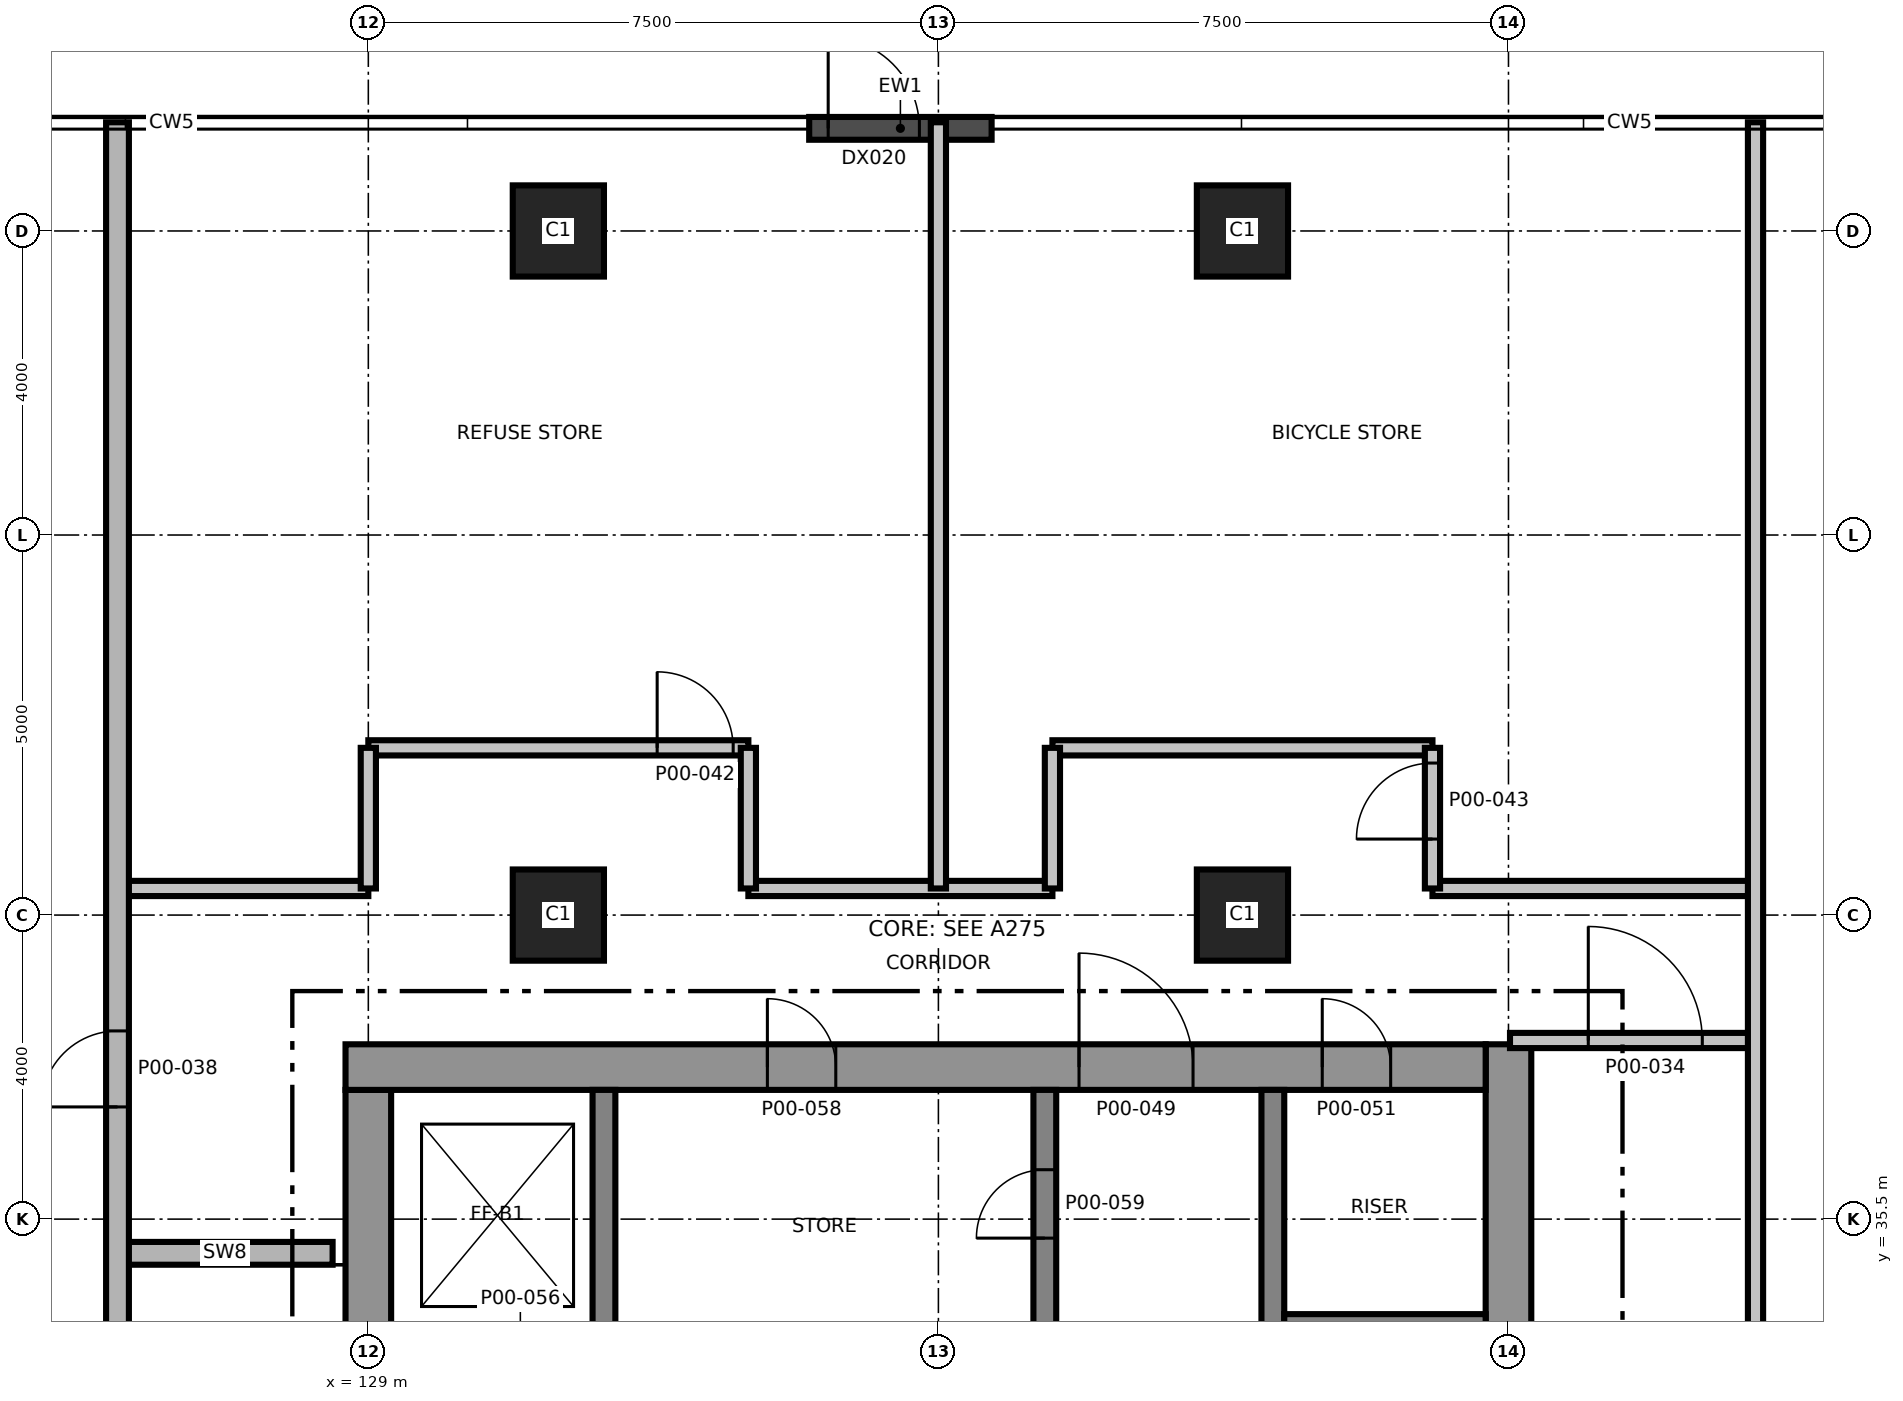
"""IFC4 building model, lengths in metres.
Left out: names, types, materials, properties, quantities, classifications, styles, units other than length and angle.
Written with IfcOpenShell. Run it as: python <this file> out.ifc"""

import sys

from ifc_helpers import new_model, si_unit, direction, frame, frame_2d, origin, origin_2d, place, context, subcontext, project, spatial, rectangle, extrude, element, fill, save


model = new_model("IFC4")
c1 = context("Model", 3, precision=1e-05, world=origin(), true_north=direction((0.0, 1.0)))
c2 = subcontext(c1, "Body", "Model", "MODEL_VIEW")
j1 = project(units=[si_unit("LENGTHUNIT", "METRE"), si_unit("PLANEANGLEUNIT", "RADIAN")], contexts=[c1])
p1 = place(None, origin())
s1 = spatial("IfcSite", under=j1, at=p1, CompositionType="ELEMENT")
p2 = place(p1, origin())
s2 = spatial("IfcBuilding", under=s1, at=p2, CompositionType="ELEMENT")
p3 = place(p2, origin())
s3 = spatial("IfcBuildingStorey", under=s2, at=p3, CompositionType="ELEMENT", Elevation=0.0)
p4 = place(p3, frame((129.0, 24.8, 0.0), z_axis=(0.0, 0.0, 1.0), x_axis=(0.0, 1.0, 0.0)))
e1 = element("IfcWall", 1, at=p4, inside=s3, PredefinedType="SHEAR", context=c2, shape_type="SweptSolid", body=[
    extrude(rectangle(XDim=12.4, YDim=0.6, at=frame_2d((6.2, 0.0))), origin(), (0.0, 0.0, 1.0), 8.0),
])
p5 = place(p4, frame((5.15, 0.0, 0.0)))
e2 = element("IfcOpeningElement", 2, at=p5, cuts=e1, PredefinedType="OPENING", context=c2, shape_type="SweptSolid", body=[
    extrude(rectangle(XDim=1.0, YDim=2.1, at=frame_2d((0.5, 1.05))), frame((0.0, 0.31, 0.0), z_axis=(0.0, -1.0, 0.0), x_axis=(1.0, 0.0, 0.0)), (0.0, 0.0, 1.0), 0.62),
])
p6 = place(p3, frame((144.0, 24.2, 0.0), z_axis=(0.0, 0.0, 1.0), x_axis=(0.0, 1.0, 0.0)))
e3 = element("IfcWall", 3, at=p6, inside=s3, PredefinedType="SHEAR", context=c2, shape_type="SweptSolid", body=[
    extrude(rectangle(XDim=13.6, YDim=0.6, at=frame_2d((6.8, 0.0))), origin(), (0.0, 0.0, 1.0), 8.0),
])
p7 = place(p3, frame((128.7, 37.5, 0.0), z_axis=(0.0, 0.0, 1.0), x_axis=(1.0, 0.0, 0.0)))
e4 = element("IfcWall", 4, at=p7, inside=s3, PredefinedType="SHEAR", context=c2, shape_type="SweptSolid", body=[
    extrude(rectangle(XDim=15.0, YDim=0.6, at=frame_2d((7.5, 0.0))), origin(), (0.0, 0.0, 1.0), 8.0),
])
p8 = place(p7, frame((9.65, 0.0, 0.0)))
e5 = element("IfcOpeningElement", 5, at=p8, cuts=e4, PredefinedType="OPENING", context=c2, shape_type="SweptSolid", body=[
    extrude(rectangle(XDim=1.5, YDim=2.1, at=frame_2d((0.75, 1.05))), frame((0.0, 0.31, 0.0), z_axis=(0.0, -1.0, 0.0), x_axis=(1.0, 0.0, 0.0)), (0.0, 0.0, 1.0), 0.62),
])
p9 = place(p7, frame((12.85, 0.0, 0.0)))
e6 = element("IfcOpeningElement", 6, at=p9, cuts=e4, PredefinedType="OPENING", context=c2, shape_type="SweptSolid", body=[
    extrude(rectangle(XDim=0.9, YDim=2.1, at=frame_2d((0.45, 1.05))), frame((0.0, 0.31, 0.0), z_axis=(0.0, -1.0, 0.0), x_axis=(1.0, 0.0, 0.0)), (0.0, 0.0, 1.0), 0.62),
])
p10 = place(p7, frame((5.55, 0.0, 0.0)))
e7 = element("IfcOpeningElement", 7, at=p10, cuts=e4, PredefinedType="OPENING", context=c2, shape_type="SweptSolid", body=[
    extrude(rectangle(XDim=0.9, YDim=2.1, at=frame_2d((0.45, 1.05))), frame((0.0, 0.31, 0.0), z_axis=(0.0, -1.0, 0.0), x_axis=(1.0, 0.0, 0.0)), (0.0, 0.0, 1.0), 0.62),
])
p11 = place(p3, frame((132.1, 24.8, 0.0), z_axis=(0.0, 0.0, 1.0), x_axis=(0.0, 1.0, 0.0)))
e8 = element("IfcWall", 8, at=p11, inside=s3, PredefinedType="SHEAR", context=c2, shape_type="SweptSolid", body=[
    extrude(rectangle(XDim=12.4, YDim=0.3, at=frame_2d((6.2, 0.0))), origin(), (0.0, 0.0, 1.0), 8.0),
])
p12 = place(p11, frame((3.9, 0.0, 0.0)))
e9 = element("IfcOpeningElement", 9, at=p12, cuts=e8, PredefinedType="OPENING", context=c2, shape_type="SweptSolid", body=[
    extrude(rectangle(XDim=1.2, YDim=2.1, at=frame_2d((0.6, 1.05))), frame((0.0, 0.16, 0.0), z_axis=(0.0, -1.0, 0.0), x_axis=(1.0, 0.0, 0.0)), (0.0, 0.0, 1.0), 0.32),
])
p13 = place(p3, frame((137.9, 24.8, 0.0), z_axis=(0.0, 0.0, 1.0), x_axis=(0.0, 1.0, 0.0)))
e10 = element("IfcWall", 10, at=p13, inside=s3, PredefinedType="SHEAR", context=c2, shape_type="SweptSolid", body=[
    extrude(rectangle(XDim=12.4, YDim=0.3, at=frame_2d((6.2, 0.0))), origin(), (0.0, 0.0, 1.0), 8.0),
])
p14 = place(p13, frame((3.95, 0.0, 0.0)))
e11 = element("IfcOpeningElement", 11, at=p14, cuts=e10, PredefinedType="OPENING", context=c2, shape_type="SweptSolid", body=[
    extrude(rectangle(XDim=1.5, YDim=2.1, at=frame_2d((0.75, 1.05))), frame((0.0, 0.16, 0.0), z_axis=(0.0, -1.0, 0.0), x_axis=(1.0, 0.0, 0.0)), (0.0, 0.0, 1.0), 0.32),
])
p15 = place(p13, frame((10.45, 0.0, 0.0)))
e12 = element("IfcOpeningElement", 12, at=p15, cuts=e10, PredefinedType="OPENING", context=c2, shape_type="SweptSolid", body=[
    extrude(rectangle(XDim=0.9, YDim=2.1, at=frame_2d((0.45, 1.05))), frame((0.0, 0.16, 0.0), z_axis=(0.0, -1.0, 0.0), x_axis=(1.0, 0.0, 0.0)), (0.0, 0.0, 1.0), 0.32),
])
p16 = place(p3, frame((140.9, 24.8, 0.0), z_axis=(0.0, 0.0, 1.0), x_axis=(0.0, 1.0, 0.0)))
e13 = element("IfcWall", 13, at=p16, inside=s3, PredefinedType="SHEAR", context=c2, shape_type="SweptSolid", body=[
    extrude(rectangle(XDim=12.4, YDim=0.3, at=frame_2d((6.2, 0.0))), origin(), (0.0, 0.0, 1.0), 8.0),
])
p17 = place(p16, frame((5.9, 0.0, 0.0)))
e14 = element("IfcOpeningElement", 14, at=p17, cuts=e13, PredefinedType="OPENING", context=c2, shape_type="SweptSolid", body=[
    extrude(rectangle(XDim=1.2, YDim=2.1, at=frame_2d((0.6, 1.05))), frame((0.0, 0.16, 0.0), z_axis=(0.0, -1.0, 0.0), x_axis=(1.0, 0.0, 0.0)), (0.0, 0.0, 1.0), 0.32),
])
p18 = place(p3, frame((141.05, 34.1, 0.0), z_axis=(0.0, 0.0, 1.0), x_axis=(1.0, 0.0, 0.0)))
e15 = element("IfcWall", 15, at=p18, inside=s3, PredefinedType="SHEAR", context=c2, shape_type="SweptSolid", body=[
    extrude(rectangle(XDim=2.65, YDim=0.3, at=frame_2d((1.325, 0.0))), origin(), (0.0, 0.0, 1.0), 8.0),
])
for number, where, z_axis, x_axis in (
    (16, (131.5, 39.5, 0.0), (0.0, 0.0, 1.0), (1.0, 0.0, 0.0)),
    (17, (140.5, 39.5, 0.0), (0.0, 0.0, 1.0), (1.0, 0.0, 0.0)),
    (18, (131.5, 48.5, 0.0), (0.0, 0.0, 1.0), (1.0, 0.0, 0.0)),
    (19, (140.5, 48.5, 0.0), (0.0, 0.0, 1.0), (1.0, 0.0, 0.0)),
):
    element("IfcColumn", number, at=place(p3, frame(where, z_axis=z_axis, x_axis=x_axis)), inside=s3, PredefinedType="COLUMN", context=c2, shape_type="SweptSolid", body=[
        extrude(rectangle(XDim=1.2, YDim=1.2, at=origin_2d()), origin(), (0.0, 0.0, 1.0), 8.0),
    ])
p19 = place(p3, frame((134.8, 49.85, 0.0), z_axis=(0.0, 0.0, 1.0), x_axis=(1.0, 0.0, 0.0)))
e20 = element("IfcWall", 20, at=p19, inside=s3, PredefinedType="SOLIDWALL", context=c2, shape_type="SweptSolid", body=[
    extrude(rectangle(XDim=2.4, YDim=0.3, at=frame_2d((1.2, 0.0))), origin(), (0.0, 0.0, 1.0), 7.7),
])
p20 = place(p19, frame((0.25, 0.0, 0.0)))
e21 = element("IfcOpeningElement", 21, at=p20, cuts=e20, PredefinedType="OPENING", context=c2, shape_type="SweptSolid", body=[
    extrude(rectangle(XDim=1.2, YDim=2.4, at=frame_2d((0.6, 1.2))), frame((0.0, 0.16, 0.0), z_axis=(0.0, -1.0, 0.0), x_axis=(1.0, 0.0, 0.0)), (0.0, 0.0, 1.0), 0.32),
])
p21 = place(p3, frame((125.7, 35.05, 0.0), z_axis=(0.0, 0.0, 1.0), x_axis=(1.0, 0.0, 0.0)))
e22 = element("IfcWall", 22, at=p21, inside=s3, PredefinedType="SHEAR", context=c2, shape_type="SweptSolid", body=[
    extrude(rectangle(XDim=2.83, YDim=0.3, at=frame_2d((1.415, 0.0))), origin(), (0.0, 0.0, 1.0), 7.7),
])
p22 = place(p3, frame((144.02, 37.85, 0.0), z_axis=(0.0, 0.0, 1.0), x_axis=(1.0, 0.0, 0.0)))
e23 = element("IfcWall", 23, at=p22, inside=s3, PredefinedType="PARTITIONING", context=c2, shape_type="SweptSolid", body=[
    extrude(rectangle(XDim=3.23, YDim=0.2, at=frame_2d((1.615, 0.0))), origin(), (0.0, 0.0, 1.0), 7.7),
])
p23 = place(p22, frame((1.03, 0.0, 0.0)))
e24 = element("IfcOpeningElement", 24, at=p23, cuts=e23, PredefinedType="OPENING", context=c2, shape_type="SweptSolid", body=[
    extrude(rectangle(XDim=1.5, YDim=2.1, at=frame_2d((0.75, 1.05))), frame((0.0, 0.11, 0.0), z_axis=(0.0, -1.0, 0.0), x_axis=(1.0, 0.0, 0.0)), (0.0, 0.0, 1.0), 0.22),
])
p24 = place(p3, frame((125.75, 39.85, 0.0), z_axis=(0.0, 0.0, 1.0), x_axis=(1.0, 0.0, 0.0)))
e25 = element("IfcWall", 25, at=p24, inside=s3, PredefinedType="PARTITIONING", context=c2, shape_type="SweptSolid", body=[
    extrude(rectangle(XDim=3.25, YDim=0.2, at=frame_2d((1.625, 0.0))), origin(), (0.0, 0.0, 1.0), 7.7),
])
p25 = place(p3, frame((134.0, 39.85, 0.0), z_axis=(0.0, 0.0, 1.0), x_axis=(1.0, 0.0, 0.0)))
e26 = element("IfcWall", 26, at=p25, inside=s3, PredefinedType="PARTITIONING", context=c2, shape_type="SweptSolid", body=[
    extrude(rectangle(XDim=4.0, YDim=0.2, at=frame_2d((2.0, 0.0))), origin(), (0.0, 0.0, 1.0), 7.7),
])
p26 = place(p3, frame((143.0, 39.85, 0.0), z_axis=(0.0, 0.0, 1.0), x_axis=(1.0, 0.0, 0.0)))
e27 = element("IfcWall", 27, at=p26, inside=s3, PredefinedType="PARTITIONING", context=c2, shape_type="SweptSolid", body=[
    extrude(rectangle(XDim=4.25, YDim=0.2, at=frame_2d((2.125, 0.0))), origin(), (0.0, 0.0, 1.0), 7.7),
])
p27 = place(p3, frame((129.0, 41.7, 0.0), z_axis=(0.0, 0.0, 1.0), x_axis=(1.0, 0.0, 0.0)))
e28 = element("IfcWall", 28, at=p27, inside=s3, PredefinedType="PARTITIONING", context=c2, shape_type="SweptSolid", body=[
    extrude(rectangle(XDim=5.0, YDim=0.2, at=frame_2d((2.5, 0.0))), origin(), (0.0, 0.0, 1.0), 7.7),
])
p28 = place(p27, frame((3.8, 0.0, 0.0)))
e29 = element("IfcOpeningElement", 29, at=p28, cuts=e28, PredefinedType="OPENING", context=c2, shape_type="SweptSolid", body=[
    extrude(rectangle(XDim=1.0, YDim=2.1, at=frame_2d((0.5, 1.05))), frame((0.0, 0.11, 0.0), z_axis=(0.0, -1.0, 0.0), x_axis=(1.0, 0.0, 0.0)), (0.0, 0.0, 1.0), 0.22),
])
p29 = place(p3, frame((138.0, 41.7, 0.0), z_axis=(0.0, 0.0, 1.0), x_axis=(1.0, 0.0, 0.0)))
e30 = element("IfcWall", 30, at=p29, inside=s3, PredefinedType="PARTITIONING", context=c2, shape_type="SweptSolid", body=[
    extrude(rectangle(XDim=5.0, YDim=0.2, at=frame_2d((2.5, 0.0))), origin(), (0.0, 0.0, 1.0), 7.7),
])
p30 = place(p3, frame((125.7, 11.07, 0.0), z_axis=(0.0, 0.0, 1.0), x_axis=(0.0, 1.0, 0.0)))
e31 = element("IfcWall", 31, at=p30, inside=s3, PredefinedType="SHEAR", context=c2, shape_type="SweptSolid", body=[
    extrude(rectangle(XDim=38.86, YDim=0.3, at=frame_2d((19.43, 0.0))), origin(), (0.0, 0.0, 1.0), 7.7),
])
p31 = place(p30, frame((25.906, 0.0, 0.0)))
e32 = element("IfcOpeningElement", 32, at=p31, cuts=e31, PredefinedType="OPENING", context=c2, shape_type="SweptSolid", body=[
    extrude(rectangle(XDim=1.0, YDim=2.1, at=frame_2d((0.5, 1.05))), frame((0.0, 0.16, 0.0), z_axis=(0.0, -1.0, 0.0), x_axis=(1.0, 0.0, 0.0)), (0.0, 0.0, 1.0), 0.32),
])
for number, where, z_axis, x_axis in (
    (33, (129.0, 39.85, 0.0), (0.0, 0.0, 1.0), (0.0, 1.0, 0.0)),
    (34, (134.0, 39.85, 0.0), (0.0, 0.0, 1.0), (0.0, 1.0, 0.0)),
):
    element("IfcWall", number, at=place(p3, frame(where, z_axis=z_axis, x_axis=x_axis)), inside=s3, PredefinedType="PARTITIONING", context=c2, shape_type="SweptSolid", body=[
        extrude(rectangle(XDim=1.85, YDim=0.2, at=frame_2d((0.925, 0.0))), origin(), (0.0, 0.0, 1.0), 7.7),
    ])
p32 = place(p3, frame((136.5, 39.85, 0.0), z_axis=(0.0, 0.0, 1.0), x_axis=(0.0, 1.0, 0.0)))
e35 = element("IfcWall", 35, at=p32, inside=s3, PredefinedType="PARTITIONING", context=c2, shape_type="SweptSolid", body=[
    extrude(rectangle(XDim=10.08, YDim=0.2, at=frame_2d((5.04, 0.0))), origin(), (0.0, 0.0, 1.0), 6.8),
])
p33 = place(p3, frame((138.0, 39.85, 0.0), z_axis=(0.0, 0.0, 1.0), x_axis=(0.0, 1.0, 0.0)))
e36 = element("IfcWall", 36, at=p33, inside=s3, PredefinedType="PARTITIONING", context=c2, shape_type="SweptSolid", body=[
    extrude(rectangle(XDim=1.85, YDim=0.2, at=frame_2d((0.925, 0.0))), origin(), (0.0, 0.0, 1.0), 7.7),
])
p34 = place(p3, frame((143.0, 39.85, 0.0), z_axis=(0.0, 0.0, 1.0), x_axis=(0.0, 1.0, 0.0)))
e37 = element("IfcWall", 37, at=p34, inside=s3, PredefinedType="PARTITIONING", context=c2, shape_type="SweptSolid", body=[
    extrude(rectangle(XDim=1.85, YDim=0.2, at=frame_2d((0.925, 0.0))), origin(), (0.0, 0.0, 1.0), 7.7),
])
p35 = place(p34, frame((0.65, 0.0, 0.0)))
e38 = element("IfcOpeningElement", 38, at=p35, cuts=e37, PredefinedType="OPENING", context=c2, shape_type="SweptSolid", body=[
    extrude(rectangle(XDim=1.0, YDim=2.1, at=frame_2d((0.5, 1.05))), frame((0.0, 0.11, 0.0), z_axis=(0.0, -1.0, 0.0), x_axis=(1.0, 0.0, 0.0)), (0.0, 0.0, 1.0), 0.22),
])
p36 = place(p3, frame((147.25, 11.07, 0.0), z_axis=(0.0, 0.0, 1.0), x_axis=(0.0, 1.0, 0.0)))
e39 = element("IfcWall", 39, at=p36, inside=s3, PredefinedType="PARTITIONING", context=c2, shape_type="SweptSolid", body=[
    extrude(rectangle(XDim=38.86, YDim=0.2, at=frame_2d((19.43, 0.0))), origin(), (0.0, 0.0, 1.0), 6.8),
])
p37 = place(p36, frame((18.18, 0.0, 0.0)))
e40 = element("IfcOpeningElement", 40, at=p37, cuts=e39, PredefinedType="OPENING", context=c2, shape_type="SweptSolid", body=[
    extrude(rectangle(XDim=1.5, YDim=2.1, at=frame_2d((0.75, 1.05))), frame((0.0, 0.11, 0.0), z_axis=(0.0, -1.0, 0.0), x_axis=(1.0, 0.0, 0.0)), (0.0, 0.0, 1.0), 0.22),
])
p38 = place(p36, frame((5.03, 0.0, 0.0)))
e41 = element("IfcOpeningElement", 41, at=p38, cuts=e39, PredefinedType="OPENING", context=c2, shape_type="SweptSolid", body=[
    extrude(rectangle(XDim=1.0, YDim=2.1, at=frame_2d((0.5, 1.05))), frame((0.0, 0.11, 0.0), z_axis=(0.0, -1.0, 0.0), x_axis=(1.0, 0.0, 0.0)), (0.0, 0.0, 1.0), 0.22),
])
p39 = place(p20, origin())
e42 = element("IfcDoor", 42, at=p39, inside=s3, OperationType="SINGLE_SWING_LEFT", PredefinedType="DOOR", context=c2, shape_type="SweptSolid", body=[
    extrude(rectangle(XDim=1.2, YDim=2.4, at=frame_2d((0.6, 1.2))), frame((0.0, 0.025, 0.0), z_axis=(0.0, -1.0, 0.0), x_axis=(1.0, 0.0, 0.0)), (0.0, 0.0, 1.0), 0.05),
])
fill(e21, e42)
p40 = place(p23, origin())
e43 = element("IfcDoor", 43, at=p40, inside=s3, OperationType="SINGLE_SWING_RIGHT", PredefinedType="DOOR", context=c2, shape_type="SweptSolid", body=[
    extrude(rectangle(XDim=1.5, YDim=2.1, at=frame_2d((0.75, 1.05))), frame((0.0, 0.025, 0.0), z_axis=(0.0, -1.0, 0.0), x_axis=(1.0, 0.0, 0.0)), (0.0, 0.0, 1.0), 0.05),
])
fill(e24, e43)
p41 = place(p31, origin())
e44 = element("IfcDoor", 44, at=p41, inside=s3, OperationType="SINGLE_SWING_RIGHT", PredefinedType="DOOR", context=c2, shape_type="SweptSolid", body=[
    extrude(rectangle(XDim=1.0, YDim=2.1, at=frame_2d((0.5, 1.05))), frame((0.0, 0.025, 0.0), z_axis=(0.0, -1.0, 0.0), x_axis=(1.0, 0.0, 0.0)), (0.0, 0.0, 1.0), 0.05),
])
fill(e32, e44)
p42 = place(p28, origin())
e45 = element("IfcDoor", 45, at=p42, inside=s3, OperationType="SINGLE_SWING_RIGHT", PredefinedType="DOOR", context=c2, shape_type="SweptSolid", body=[
    extrude(rectangle(XDim=1.0, YDim=2.1, at=frame_2d((0.5, 1.05))), frame((0.0, 0.025, 0.0), z_axis=(0.0, -1.0, 0.0), x_axis=(1.0, 0.0, 0.0)), (0.0, 0.0, 1.0), 0.05),
])
fill(e29, e45)
p43 = place(p35, origin())
e46 = element("IfcDoor", 46, at=p43, inside=s3, OperationType="SINGLE_SWING_LEFT", PredefinedType="DOOR", context=c2, shape_type="SweptSolid", body=[
    extrude(rectangle(XDim=1.0, YDim=2.1, at=frame_2d((0.5, 1.05))), frame((0.0, 0.025, 0.0), z_axis=(0.0, -1.0, 0.0), x_axis=(1.0, 0.0, 0.0)), (0.0, 0.0, 1.0), 0.05),
])
fill(e38, e46)
p44 = place(p8, origin())
e47 = element("IfcDoor", 47, at=p44, inside=s3, OperationType="SINGLE_SWING_RIGHT", PredefinedType="DOOR", context=c2, shape_type="SweptSolid", body=[
    extrude(rectangle(XDim=1.5, YDim=2.1, at=frame_2d((0.75, 1.05))), frame((0.0, 0.025, 0.0), z_axis=(0.0, -1.0, 0.0), x_axis=(1.0, 0.0, 0.0)), (0.0, 0.0, 1.0), 0.05),
])
fill(e5, e47)
p45 = place(p9, origin())
e48 = element("IfcDoor", 48, at=p45, inside=s3, OperationType="SINGLE_SWING_RIGHT", PredefinedType="DOOR", context=c2, shape_type="SweptSolid", body=[
    extrude(rectangle(XDim=0.9, YDim=2.1, at=frame_2d((0.45, 1.05))), frame((0.0, 0.025, 0.0), z_axis=(0.0, -1.0, 0.0), x_axis=(1.0, 0.0, 0.0)), (0.0, 0.0, 1.0), 0.05),
])
fill(e6, e48)
p46 = place(p10, origin())
e49 = element("IfcDoor", 49, at=p46, inside=s3, OperationType="SINGLE_SWING_LEFT", PredefinedType="DOOR", context=c2, shape_type="SweptSolid", body=[
    extrude(rectangle(XDim=0.9, YDim=2.1, at=frame_2d((0.45, 1.05))), frame((0.0, 0.025, 0.0), z_axis=(0.0, -1.0, 0.0), x_axis=(1.0, 0.0, 0.0)), (0.0, 0.0, 1.0), 0.05),
])
fill(e7, e49)
p47 = place(p15, origin())
e50 = element("IfcDoor", 50, at=p47, inside=s3, OperationType="SINGLE_SWING_RIGHT", PredefinedType="DOOR", context=c2, shape_type="SweptSolid", body=[
    extrude(rectangle(XDim=0.9, YDim=2.1, at=frame_2d((0.45, 1.05))), frame((0.0, 0.025, 0.0), z_axis=(0.0, -1.0, 0.0), x_axis=(1.0, 0.0, 0.0)), (0.0, 0.0, 1.0), 0.05),
])
fill(e12, e50)
save(model, sys.argv[1])
